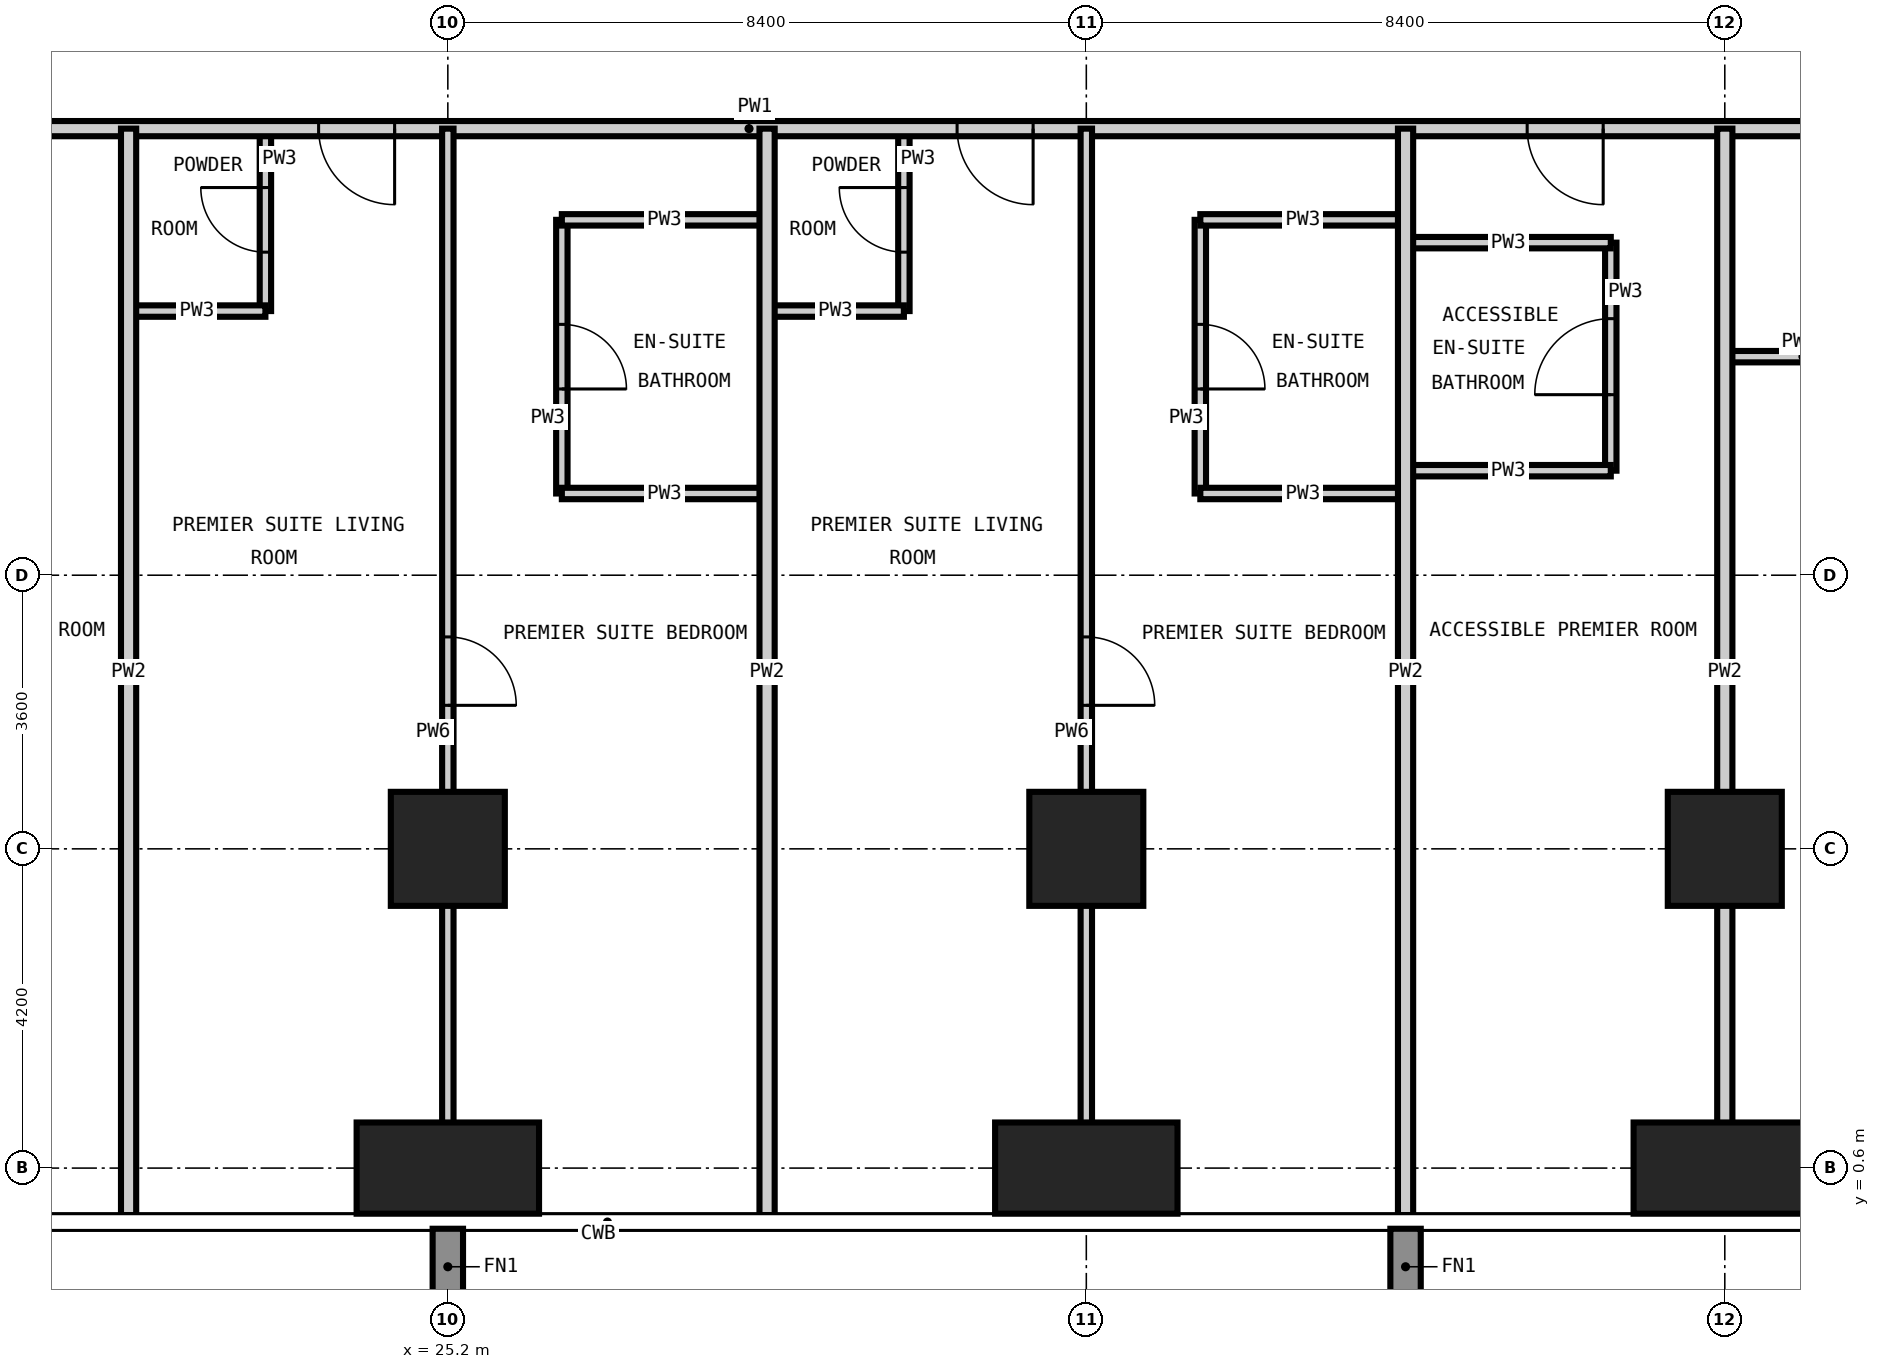
"""IFC4 building model, lengths in metres.
Left out: names, types, materials, properties, quantities, classifications, styles, units other than length and angle.
Written with IfcOpenShell. Run it as: python <this file> out.ifc"""

import sys

from ifc_helpers import new_model, si_unit, direction, frame, frame_2d, origin, origin_2d, place, context, subcontext, project, spatial, rectangle, extrude, element, fill, save


model = new_model("IFC4")
c1 = context("Model", 3, precision=1e-05, world=origin(), true_north=direction((0.0, 1.0)))
c2 = subcontext(c1, "Body", "Model", "MODEL_VIEW")
j1 = project(units=[si_unit("LENGTHUNIT", "METRE"), si_unit("PLANEANGLEUNIT", "RADIAN")], contexts=[c1])
p1 = place(None, origin())
s1 = spatial("IfcSite", under=j1, at=p1, CompositionType="ELEMENT")
p2 = place(p1, origin())
s2 = spatial("IfcBuilding", under=s1, at=p2, CompositionType="ELEMENT")
p3 = place(p2, frame((0.0, 0.0, 133.2)))
s3 = spatial("IfcBuildingStorey", under=s2, at=p3, CompositionType="ELEMENT", Elevation=133.2)
p4 = place(p3, frame((25.2, 0.6, -0.35), z_axis=(0.0, 0.0, 1.0), x_axis=(1.0, 0.0, 0.0)))
e1 = element("IfcColumn", 1, at=p4, inside=s3, PredefinedType="COLUMN", context=c2, shape_type="SweptSolid", body=[
    extrude(rectangle(XDim=2.4, YDim=1.2, at=origin_2d()), origin(), (0.0, 0.0, 1.0), 3.6),
])
p5 = place(p3, frame((25.2, 4.8, -0.35), z_axis=(0.0, 0.0, 1.0), x_axis=(1.0, 0.0, 0.0)))
e2 = element("IfcColumn", 2, at=p5, inside=s3, PredefinedType="COLUMN", context=c2, shape_type="SweptSolid", body=[
    extrude(rectangle(XDim=1.5, YDim=1.5, at=origin_2d()), origin(), (0.0, 0.0, 1.0), 3.6),
])
p6 = place(p3, frame((33.6, 0.6, -0.35), z_axis=(0.0, 0.0, 1.0), x_axis=(1.0, 0.0, 0.0)))
e3 = element("IfcColumn", 3, at=p6, inside=s3, PredefinedType="COLUMN", context=c2, shape_type="SweptSolid", body=[
    extrude(rectangle(XDim=2.4, YDim=1.2, at=origin_2d()), origin(), (0.0, 0.0, 1.0), 3.6),
])
p7 = place(p3, frame((33.6, 4.8, -0.35), z_axis=(0.0, 0.0, 1.0), x_axis=(1.0, 0.0, 0.0)))
e4 = element("IfcColumn", 4, at=p7, inside=s3, PredefinedType="COLUMN", context=c2, shape_type="SweptSolid", body=[
    extrude(rectangle(XDim=1.5, YDim=1.5, at=origin_2d()), origin(), (0.0, 0.0, 1.0), 3.6),
])
p8 = place(p3, frame((42.0, 0.6, -0.35), z_axis=(0.0, 0.0, 1.0), x_axis=(1.0, 0.0, 0.0)))
e5 = element("IfcColumn", 5, at=p8, inside=s3, PredefinedType="COLUMN", context=c2, shape_type="SweptSolid", body=[
    extrude(rectangle(XDim=2.4, YDim=1.2, at=origin_2d()), origin(), (0.0, 0.0, 1.0), 3.6),
])
p9 = place(p3, frame((42.0, 4.8, -0.35), z_axis=(0.0, 0.0, 1.0), x_axis=(1.0, 0.0, 0.0)))
e6 = element("IfcColumn", 6, at=p9, inside=s3, PredefinedType="COLUMN", context=c2, shape_type="SweptSolid", body=[
    extrude(rectangle(XDim=1.5, YDim=1.5, at=origin_2d()), origin(), (0.0, 0.0, 1.0), 3.6),
])
p10 = place(p3, frame((22.8, 11.875, 0.0), z_axis=(0.0, 0.0, 1.0), x_axis=(0.0, 1.0, 0.0)))
e7 = element("IfcWall", 7, at=p10, inside=s3, PredefinedType="PARTITIONING", context=c2, shape_type="SweptSolid", body=[
    extrude(rectangle(XDim=2.4, YDim=0.15, at=frame_2d((1.2, 0.0))), origin(), (0.0, 0.0, 1.0), 3.25),
])
p11 = place(p10, frame((0.775, 0.0, 0.0)))
e8 = element("IfcOpeningElement", 8, at=p11, cuts=e7, PredefinedType="OPENING", context=c2, shape_type="SweptSolid", body=[
    extrude(rectangle(XDim=0.85, YDim=2.1, at=frame_2d((0.425, 1.05))), frame((0.0, 0.085, 0.0), z_axis=(0.0, -1.0, 0.0), x_axis=(1.0, 0.0, 0.0)), (0.0, 0.0, 1.0), 0.17),
])
p12 = place(p3, frame((26.7, 9.475, 0.0), z_axis=(0.0, 0.0, 1.0), x_axis=(0.0, 1.0, 0.0)))
e9 = element("IfcWall", 9, at=p12, inside=s3, PredefinedType="PARTITIONING", context=c2, shape_type="SweptSolid", body=[
    extrude(rectangle(XDim=3.6, YDim=0.15, at=frame_2d((1.8, 0.0))), origin(), (0.0, 0.0, 1.0), 3.25),
])
p13 = place(p12, frame((1.375, 0.0, 0.0)))
e10 = element("IfcOpeningElement", 10, at=p13, cuts=e9, PredefinedType="OPENING", context=c2, shape_type="SweptSolid", body=[
    extrude(rectangle(XDim=0.85, YDim=2.1, at=frame_2d((0.425, 1.05))), frame((0.0, 0.085, 0.0), z_axis=(0.0, -1.0, 0.0), x_axis=(1.0, 0.0, 0.0)), (0.0, 0.0, 1.0), 0.17),
])
p14 = place(p3, frame((31.2, 11.875, 0.0), z_axis=(0.0, 0.0, 1.0), x_axis=(0.0, 1.0, 0.0)))
e11 = element("IfcWall", 11, at=p14, inside=s3, PredefinedType="PARTITIONING", context=c2, shape_type="SweptSolid", body=[
    extrude(rectangle(XDim=2.4, YDim=0.15, at=frame_2d((1.2, 0.0))), origin(), (0.0, 0.0, 1.0), 3.25),
])
p15 = place(p14, frame((0.775, 0.0, 0.0)))
e12 = element("IfcOpeningElement", 12, at=p15, cuts=e11, PredefinedType="OPENING", context=c2, shape_type="SweptSolid", body=[
    extrude(rectangle(XDim=0.85, YDim=2.1, at=frame_2d((0.425, 1.05))), frame((0.0, 0.085, 0.0), z_axis=(0.0, -1.0, 0.0), x_axis=(1.0, 0.0, 0.0)), (0.0, 0.0, 1.0), 0.17),
])
p16 = place(p3, frame((35.1, 9.475, 0.0), z_axis=(0.0, 0.0, 1.0), x_axis=(0.0, 1.0, 0.0)))
e13 = element("IfcWall", 13, at=p16, inside=s3, PredefinedType="PARTITIONING", context=c2, shape_type="SweptSolid", body=[
    extrude(rectangle(XDim=3.6, YDim=0.15, at=frame_2d((1.8, 0.0))), origin(), (0.0, 0.0, 1.0), 3.25),
])
p17 = place(p16, frame((1.375, 0.0, 0.0)))
e14 = element("IfcOpeningElement", 14, at=p17, cuts=e13, PredefinedType="OPENING", context=c2, shape_type="SweptSolid", body=[
    extrude(rectangle(XDim=0.85, YDim=2.1, at=frame_2d((0.425, 1.05))), frame((0.0, 0.085, 0.0), z_axis=(0.0, -1.0, 0.0), x_axis=(1.0, 0.0, 0.0)), (0.0, 0.0, 1.0), 0.17),
])
p18 = place(p3, frame((40.5, 9.775, 0.0), z_axis=(0.0, 0.0, 1.0), x_axis=(0.0, 1.0, 0.0)))
e15 = element("IfcWall", 15, at=p18, inside=s3, PredefinedType="PARTITIONING", context=c2, shape_type="SweptSolid", body=[
    extrude(rectangle(XDim=3.0, YDim=0.15, at=frame_2d((1.5, 0.0))), origin(), (0.0, 0.0, 1.0), 3.25),
])
p19 = place(p18, frame((1.0, 0.0, 0.0)))
e16 = element("IfcOpeningElement", 16, at=p19, cuts=e15, PredefinedType="OPENING", context=c2, shape_type="SweptSolid", body=[
    extrude(rectangle(XDim=1.0, YDim=2.1, at=frame_2d((0.5, 1.05))), frame((0.0, 0.085, 0.0), z_axis=(0.0, -1.0, 0.0), x_axis=(1.0, 0.0, 0.0)), (0.0, 0.0, 1.0), 0.17),
])
for number, where, z_axis, x_axis in (
    (17, (26.7, 9.475, 0.0), (0.0, 0.0, 1.0), (1.0, 0.0, 0.0)),
    (18, (35.1, 9.475, 0.0), (0.0, 0.0, 1.0), (1.0, 0.0, 0.0)),
    (19, (37.8, 9.775, 0.0), (0.0, 0.0, 1.0), (1.0, 0.0, 0.0)),
):
    element("IfcWall", number, at=place(p3, frame(where, z_axis=z_axis, x_axis=x_axis)), inside=s3, PredefinedType="PARTITIONING", context=c2, shape_type="SweptSolid", body=[
        extrude(rectangle(XDim=2.7, YDim=0.15, at=frame_2d((1.35, 0.0))), origin(), (0.0, 0.0, 1.0), 3.25),
    ])
p20 = place(p3, frame((42.0, 11.275, 0.0), z_axis=(0.0, 0.0, 1.0), x_axis=(1.0, 0.0, 0.0)))
e20 = element("IfcWall", 20, at=p20, inside=s3, PredefinedType="PARTITIONING", context=c2, shape_type="SweptSolid", body=[
    extrude(rectangle(XDim=3.725, YDim=0.15, at=frame_2d((1.863, 0.0))), origin(), (0.0, 0.0, 1.0), 3.25),
])
p21 = place(p20, frame((1.438, 0.0, 0.0)))
e21 = element("IfcOpeningElement", 21, at=p21, cuts=e20, PredefinedType="OPENING", context=c2, shape_type="SweptSolid", body=[
    extrude(rectangle(XDim=0.85, YDim=2.1, at=frame_2d((0.425, 1.05))), frame((0.0, 0.085, 0.0), z_axis=(0.0, -1.0, 0.0), x_axis=(1.0, 0.0, 0.0)), (0.0, 0.0, 1.0), 0.17),
])
for number, where, z_axis, x_axis in (
    (22, (21.0, 11.875, 0.0), (0.0, 0.0, 1.0), (1.0, 0.0, 0.0)),
    (23, (29.4, 11.875, 0.0), (0.0, 0.0, 1.0), (1.0, 0.0, 0.0)),
):
    element("IfcWall", number, at=place(p3, frame(where, z_axis=z_axis, x_axis=x_axis)), inside=s3, PredefinedType="PARTITIONING", context=c2, shape_type="SweptSolid", body=[
        extrude(rectangle(XDim=1.8, YDim=0.15, at=frame_2d((0.9, 0.0))), origin(), (0.0, 0.0, 1.0), 3.25),
    ])
for number, where, z_axis, x_axis in (
    (24, (37.8, 12.775, 0.0), (0.0, 0.0, 1.0), (1.0, 0.0, 0.0)),
    (25, (26.7, 13.075, 0.0), (0.0, 0.0, 1.0), (1.0, 0.0, 0.0)),
    (26, (35.1, 13.075, 0.0), (0.0, 0.0, 1.0), (1.0, 0.0, 0.0)),
):
    element("IfcWall", number, at=place(p3, frame(where, z_axis=z_axis, x_axis=x_axis)), inside=s3, PredefinedType="PARTITIONING", context=c2, shape_type="SweptSolid", body=[
        extrude(rectangle(XDim=2.7, YDim=0.15, at=frame_2d((1.35, 0.0))), origin(), (0.0, 0.0, 1.0), 3.25),
    ])
p22 = place(p3, frame((45.725, 14.275, 0.0), z_axis=(0.0, 0.0, 1.0), x_axis=(-1.0, 0.0, 0.0)))
e27 = element("IfcWall", 27, at=p22, inside=s3, PredefinedType="PARTITIONING", context=c2, shape_type="SweptSolid", body=[
    extrude(rectangle(XDim=33.125, YDim=0.2, at=frame_2d((16.562, 0.0))), origin(), (0.0, 0.0, 1.0), 3.25),
])
p23 = place(p22, frame((26.325, 0.0, 0.0)))
e28 = element("IfcOpeningElement", 28, at=p23, cuts=e27, PredefinedType="OPENING", context=c2, shape_type="SweptSolid", body=[
    extrude(rectangle(XDim=1.0, YDim=2.2, at=frame_2d((0.5, 1.1))), frame((0.0, 0.11, 0.0), z_axis=(0.0, -1.0, 0.0), x_axis=(1.0, 0.0, 0.0)), (0.0, 0.0, 1.0), 0.22),
])
p24 = place(p22, frame((21.225, 0.0, 0.0)))
e29 = element("IfcOpeningElement", 29, at=p24, cuts=e27, PredefinedType="OPENING", context=c2, shape_type="SweptSolid", body=[
    extrude(rectangle(XDim=1.0, YDim=2.2, at=frame_2d((0.5, 1.1))), frame((0.0, 0.11, 0.0), z_axis=(0.0, -1.0, 0.0), x_axis=(1.0, 0.0, 0.0)), (0.0, 0.0, 1.0), 0.22),
])
p25 = place(p22, frame((12.825, 0.0, 0.0)))
e30 = element("IfcOpeningElement", 30, at=p25, cuts=e27, PredefinedType="OPENING", context=c2, shape_type="SweptSolid", body=[
    extrude(rectangle(XDim=1.0, YDim=2.2, at=frame_2d((0.5, 1.1))), frame((0.0, 0.11, 0.0), z_axis=(0.0, -1.0, 0.0), x_axis=(1.0, 0.0, 0.0)), (0.0, 0.0, 1.0), 0.22),
])
p26 = place(p22, frame((5.325, 0.0, 0.0)))
e31 = element("IfcOpeningElement", 31, at=p26, cuts=e27, PredefinedType="OPENING", context=c2, shape_type="SweptSolid", body=[
    extrude(rectangle(XDim=1.0, YDim=2.2, at=frame_2d((0.5, 1.1))), frame((0.0, 0.11, 0.0), z_axis=(0.0, -1.0, 0.0), x_axis=(1.0, 0.0, 0.0)), (0.0, 0.0, 1.0), 0.22),
])
for number, where, z_axis, x_axis in (
    (32, (21.0, -0.018, 0.0), (0.0, 0.0, 1.0), (0.0, 1.0, 0.0)),
    (33, (29.4, -0.018, 0.0), (0.0, 0.0, 1.0), (0.0, 1.0, 0.0)),
    (34, (37.8, -0.018, 0.0), (0.0, 0.0, 1.0), (0.0, 1.0, 0.0)),
    (35, (42.0, -0.018, 0.0), (0.0, 0.0, 1.0), (0.0, 1.0, 0.0)),
):
    element("IfcWall", number, at=place(p3, frame(where, z_axis=z_axis, x_axis=x_axis)), inside=s3, PredefinedType="PARTITIONING", context=c2, shape_type="SweptSolid", body=[
        extrude(rectangle(XDim=14.293, YDim=0.2, at=frame_2d((7.146, 0.0))), origin(), (0.0, 0.0, 1.0), 3.25),
    ])
p27 = place(p3, frame((25.2, -0.018, 0.0), z_axis=(0.0, 0.0, 1.0), x_axis=(0.0, 1.0, 0.0)))
e36 = element("IfcWall", 36, at=p27, inside=s3, PredefinedType="PARTITIONING", context=c2, shape_type="SweptSolid", body=[
    extrude(rectangle(XDim=14.293, YDim=0.15, at=frame_2d((7.146, 0.0))), origin(), (0.0, 0.0, 1.0), 3.25),
])
p28 = place(p27, frame((6.706, 0.0, 0.0)))
e37 = element("IfcOpeningElement", 37, at=p28, cuts=e36, PredefinedType="OPENING", context=c2, shape_type="SweptSolid", body=[
    extrude(rectangle(XDim=0.9, YDim=2.1, at=frame_2d((0.45, 1.05))), frame((0.0, 0.085, 0.0), z_axis=(0.0, -1.0, 0.0), x_axis=(1.0, 0.0, 0.0)), (0.0, 0.0, 1.0), 0.17),
])
p29 = place(p3, frame((33.6, -0.018, 0.0), z_axis=(0.0, 0.0, 1.0), x_axis=(0.0, 1.0, 0.0)))
e38 = element("IfcWall", 38, at=p29, inside=s3, PredefinedType="PARTITIONING", context=c2, shape_type="SweptSolid", body=[
    extrude(rectangle(XDim=14.293, YDim=0.15, at=frame_2d((7.146, 0.0))), origin(), (0.0, 0.0, 1.0), 3.25),
])
p30 = place(p29, frame((6.706, 0.0, 0.0)))
e39 = element("IfcOpeningElement", 39, at=p30, cuts=e38, PredefinedType="OPENING", context=c2, shape_type="SweptSolid", body=[
    extrude(rectangle(XDim=0.9, YDim=2.1, at=frame_2d((0.45, 1.05))), frame((0.0, 0.085, 0.0), z_axis=(0.0, -1.0, 0.0), x_axis=(1.0, 0.0, 0.0)), (0.0, 0.0, 1.0), 0.17),
])
p31 = place(p24, origin())
e40 = element("IfcDoor", 40, at=p31, inside=s3, OperationType="SINGLE_SWING_LEFT", PredefinedType="DOOR", context=c2, shape_type="SweptSolid", body=[
    extrude(rectangle(XDim=1.0, YDim=2.2, at=frame_2d((0.5, 1.1))), frame((0.0, 0.025, 0.0), z_axis=(0.0, -1.0, 0.0), x_axis=(1.0, 0.0, 0.0)), (0.0, 0.0, 1.0), 0.05),
])
fill(e29, e40)
p32 = place(p11, origin())
e41 = element("IfcDoor", 41, at=p32, inside=s3, OperationType="SINGLE_SWING_RIGHT", PredefinedType="DOOR", context=c2, shape_type="SweptSolid", body=[
    extrude(rectangle(XDim=0.85, YDim=2.1, at=frame_2d((0.425, 1.05))), frame((0.0, 0.025, 0.0), z_axis=(0.0, -1.0, 0.0), x_axis=(1.0, 0.0, 0.0)), (0.0, 0.0, 1.0), 0.05),
])
fill(e8, e41)
p33 = place(p28, frame((0.9, 0.0, 0.0), z_axis=(0.0, 0.0, 1.0), x_axis=(-1.0, 0.0, 0.0)))
e42 = element("IfcDoor", 42, at=p33, inside=s3, OperationType="SINGLE_SWING_RIGHT", PredefinedType="DOOR", context=c2, shape_type="SweptSolid", body=[
    extrude(rectangle(XDim=0.9, YDim=2.1, at=frame_2d((0.45, 1.05))), frame((0.0, 0.025, 0.0), z_axis=(0.0, -1.0, 0.0), x_axis=(1.0, 0.0, 0.0)), (0.0, 0.0, 1.0), 0.05),
])
fill(e37, e42)
p34 = place(p13, frame((0.85, 0.0, 0.0), z_axis=(0.0, 0.0, 1.0), x_axis=(-1.0, 0.0, 0.0)))
e43 = element("IfcDoor", 43, at=p34, inside=s3, OperationType="SINGLE_SWING_RIGHT", PredefinedType="DOOR", context=c2, shape_type="SweptSolid", body=[
    extrude(rectangle(XDim=0.85, YDim=2.1, at=frame_2d((0.425, 1.05))), frame((0.0, 0.025, 0.0), z_axis=(0.0, -1.0, 0.0), x_axis=(1.0, 0.0, 0.0)), (0.0, 0.0, 1.0), 0.05),
])
fill(e10, e43)
p35 = place(p25, origin())
e44 = element("IfcDoor", 44, at=p35, inside=s3, OperationType="SINGLE_SWING_LEFT", PredefinedType="DOOR", context=c2, shape_type="SweptSolid", body=[
    extrude(rectangle(XDim=1.0, YDim=2.2, at=frame_2d((0.5, 1.1))), frame((0.0, 0.025, 0.0), z_axis=(0.0, -1.0, 0.0), x_axis=(1.0, 0.0, 0.0)), (0.0, 0.0, 1.0), 0.05),
])
fill(e30, e44)
p36 = place(p15, origin())
e45 = element("IfcDoor", 45, at=p36, inside=s3, OperationType="SINGLE_SWING_RIGHT", PredefinedType="DOOR", context=c2, shape_type="SweptSolid", body=[
    extrude(rectangle(XDim=0.85, YDim=2.1, at=frame_2d((0.425, 1.05))), frame((0.0, 0.025, 0.0), z_axis=(0.0, -1.0, 0.0), x_axis=(1.0, 0.0, 0.0)), (0.0, 0.0, 1.0), 0.05),
])
fill(e12, e45)
p37 = place(p30, frame((0.9, 0.0, 0.0), z_axis=(0.0, 0.0, 1.0), x_axis=(-1.0, 0.0, 0.0)))
e46 = element("IfcDoor", 46, at=p37, inside=s3, OperationType="SINGLE_SWING_RIGHT", PredefinedType="DOOR", context=c2, shape_type="SweptSolid", body=[
    extrude(rectangle(XDim=0.9, YDim=2.1, at=frame_2d((0.45, 1.05))), frame((0.0, 0.025, 0.0), z_axis=(0.0, -1.0, 0.0), x_axis=(1.0, 0.0, 0.0)), (0.0, 0.0, 1.0), 0.05),
])
fill(e39, e46)
p38 = place(p17, frame((0.85, 0.0, 0.0), z_axis=(0.0, 0.0, 1.0), x_axis=(-1.0, 0.0, 0.0)))
e47 = element("IfcDoor", 47, at=p38, inside=s3, OperationType="SINGLE_SWING_RIGHT", PredefinedType="DOOR", context=c2, shape_type="SweptSolid", body=[
    extrude(rectangle(XDim=0.85, YDim=2.1, at=frame_2d((0.425, 1.05))), frame((0.0, 0.025, 0.0), z_axis=(0.0, -1.0, 0.0), x_axis=(1.0, 0.0, 0.0)), (0.0, 0.0, 1.0), 0.05),
])
fill(e14, e47)
p39 = place(p26, origin())
e48 = element("IfcDoor", 48, at=p39, inside=s3, OperationType="SINGLE_SWING_LEFT", PredefinedType="DOOR", context=c2, shape_type="SweptSolid", body=[
    extrude(rectangle(XDim=1.0, YDim=2.2, at=frame_2d((0.5, 1.1))), frame((0.0, 0.025, 0.0), z_axis=(0.0, -1.0, 0.0), x_axis=(1.0, 0.0, 0.0)), (0.0, 0.0, 1.0), 0.05),
])
fill(e31, e48)
p40 = place(p19, origin())
e49 = element("IfcDoor", 49, at=p40, inside=s3, OperationType="SINGLE_SWING_LEFT", PredefinedType="DOOR", context=c2, shape_type="SweptSolid", body=[
    extrude(rectangle(XDim=1.0, YDim=2.1, at=frame_2d((0.5, 1.05))), frame((0.0, 0.025, 0.0), z_axis=(0.0, -1.0, 0.0), x_axis=(1.0, 0.0, 0.0)), (0.0, 0.0, 1.0), 0.05),
])
fill(e16, e49)
save(model, sys.argv[1])
